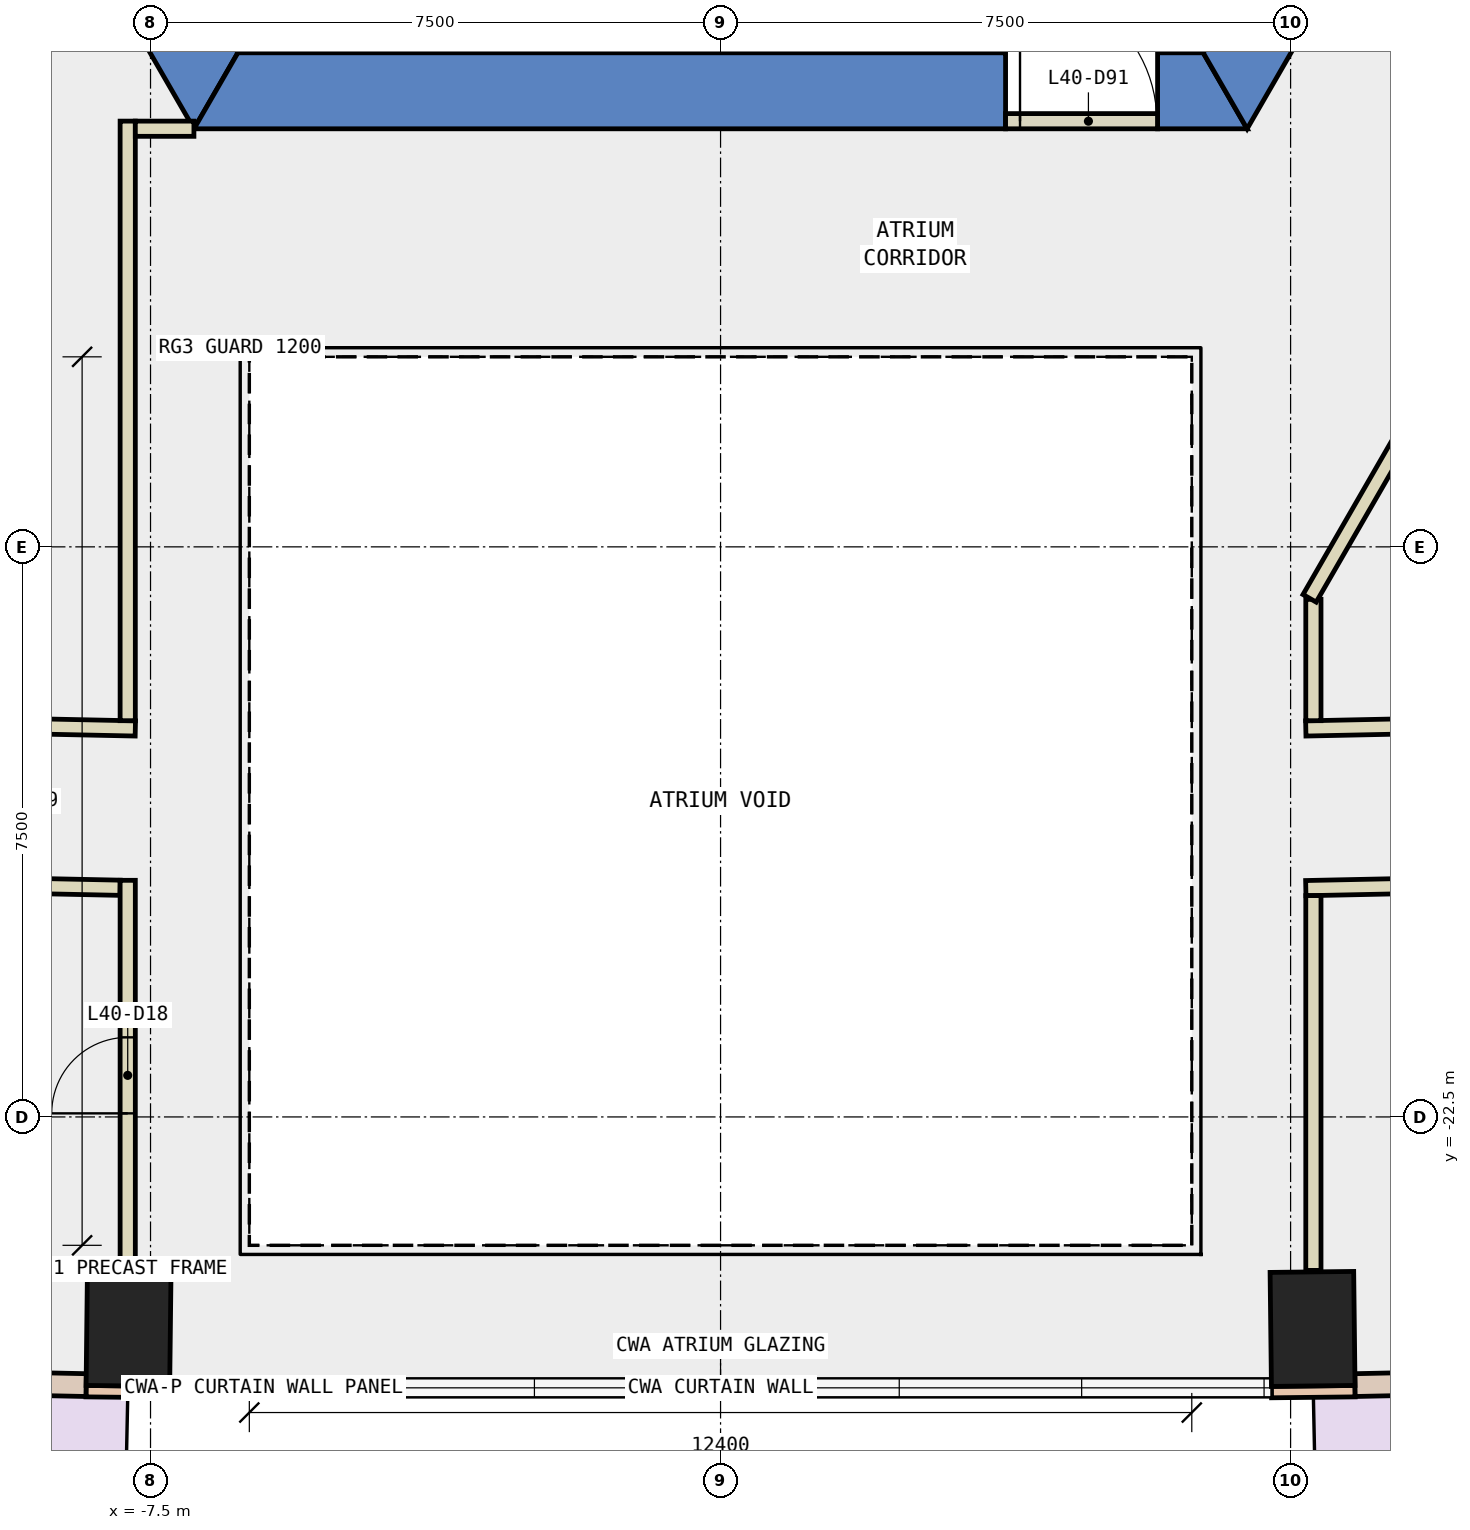
"""IFC4 building model, lengths in metres.
Left out: names, types, materials, properties, quantities, classifications, styles, units other than length and angle.
Written with IfcOpenShell. Run it as: python <this file> out.ifc"""

import sys

from ifc_helpers import new_model, si_unit, direction, frame, frame_2d, origin, origin_2d, place, context, subcontext, project, spatial, polyline, rectangle, outline, extrude, element, fill, save


model = new_model("IFC4")
c1 = context("Model", 3, precision=1e-05, world=origin(), true_north=direction((0.0, 1.0)))
c2 = subcontext(c1, "Body", "Model", "MODEL_VIEW")
j1 = project(units=[si_unit("LENGTHUNIT", "METRE"), si_unit("PLANEANGLEUNIT", "RADIAN")], contexts=[c1])
p1 = place(None, origin())
s1 = spatial("IfcSite", under=j1, at=p1, CompositionType="ELEMENT")
p2 = place(p1, origin())
s2 = spatial("IfcBuilding", under=s1, at=p2, CompositionType="ELEMENT")
p3 = place(p2, frame((0.0, 0.0, 180.2)))
s3 = spatial("IfcBuildingStorey", under=s2, at=p3, CompositionType="ELEMENT", Elevation=180.2)
for number, where, z_axis, x_axis in (
    (1, (-7.789, -25.289, -0.4), (0.0, 0.0, 1.0), (-1.0, 0.012, 0.0)),
    (2, (7.789, -25.289, -0.4), (0.0, 0.0, 1.0), (1.0, 0.012, 0.0)),
):
    element("IfcColumn", number, at=place(p3, frame(where, z_axis=z_axis, x_axis=x_axis)), inside=s3, PredefinedType="COLUMN", context=c2, shape_type="SweptSolid", body=[
        extrude(rectangle(XDim=1.1, YDim=1.5, at=origin_2d()), origin(), (0.0, 0.0, 1.0), 4.0),
    ])
p4 = place(p3, frame((0.0, 0.0, -0.4)))
e3 = element("IfcWall", 3, at=p4, inside=s3, PredefinedType="SHEAR", context=c2, shape_type="SweptSolid", body=[
    extrude(outline(polyline([(-13.856, 2.5), (-6.928, -9.5), (-6.351, -8.5), (-12.702, 2.5), (-13.856, 2.5)])), origin(), (0.0, 0.0, 1.0), 4.0),
])
p5 = place(p3, frame((0.0, 0.0, -0.4)))
e4 = element("IfcWall", 4, at=p5, inside=s3, PredefinedType="SHEAR", context=c2, shape_type="SweptSolid", body=[
    extrude(outline(polyline([(3.75, -9.5), (3.75, -8.5), (-6.351, -8.5), (-6.928, -9.5), (3.75, -9.5)])), origin(), (0.0, 0.0, 1.0), 4.0),
])
p6 = place(p3, frame((0.0, 0.0, -0.4)))
e5 = element("IfcWall", 5, at=p6, inside=s3, PredefinedType="SHEAR", context=c2, shape_type="SweptSolid", body=[
    extrude(outline(polyline([(5.75, -8.5), (5.75, -9.5), (6.928, -9.5), (6.351, -8.5), (5.75, -8.5)])), origin(), (0.0, 0.0, 1.0), 4.0),
])
p7 = place(p3, frame((0.0, 0.0, -0.4)))
e6 = element("IfcWall", 6, at=p7, inside=s3, PredefinedType="SHEAR", context=c2, shape_type="SweptSolid", body=[
    extrude(outline(polyline([(8.117, -7.44), (7.252, -6.94), (6.351, -8.5), (6.928, -9.5), (8.117, -7.44)])), origin(), (0.0, 0.0, 1.0), 4.0),
])
for number, where, z_axis, x_axis in (
    (7, (-8.349, -26.108, 0.0), (0.0, 0.0, 1.0), (1.0, -0.011, 0.0)),
    (8, (7.249, -26.12, 0.0), (0.0, 0.0, 1.0), (1.0, 0.011, 0.0)),
):
    element("IfcWall", number, at=place(p3, frame(where, z_axis=z_axis, x_axis=x_axis)), inside=s3, PredefinedType="STANDARD", context=c2, shape_type="SweptSolid", body=[
        extrude(rectangle(XDim=1.1, YDim=0.15, at=frame_2d((0.55, 0.0))), origin(), (0.0, 0.0, 1.0), 3.6),
    ])
p8 = place(p3, frame((-15.68, -25.875, 0.0), z_axis=(0.0, 0.0, 1.0), x_axis=(0.999782189413, -0.020870403275, 0.0)))
e9 = element("IfcWall", 9, at=p8, inside=s3, PredefinedType="STANDARD", context=c2, shape_type="SweptSolid", body=[
    extrude(rectangle(XDim=7.335, YDim=0.3, at=frame_2d((3.667, 0.0))), origin(), (0.0, 0.0, 1.0), 3.6),
])
p9 = place(p8, frame((0.834, 0.0, 0.0)))
e10 = element("IfcOpeningElement", 10, at=p9, cuts=e9, PredefinedType="OPENING", context=c2, shape_type="SweptSolid", body=[
    extrude(rectangle(XDim=2.0, YDim=2.4, at=frame_2d((1.0, 1.2))), frame((0.0, 0.16, 0.0), z_axis=(0.0, -1.0, 0.0), x_axis=(1.0, 0.0, 0.0)), (0.0, 0.0, 1.0), 0.32),
])
p10 = place(p8, frame((4.301, 0.0, 0.9)))
e11 = element("IfcOpeningElement", 11, at=p10, cuts=e9, PredefinedType="OPENING", context=c2, shape_type="SweptSolid", body=[
    extrude(rectangle(XDim=2.4, YDim=2.6, at=frame_2d((1.2, 1.3))), frame((0.0, 0.16, 0.0), z_axis=(0.0, -1.0, 0.0), x_axis=(1.0, 0.0, 0.0)), (0.0, 0.0, 1.0), 0.32),
])
p11 = place(p3, frame((8.347, -26.028, 0.0), z_axis=(0.0, 0.0, 1.0), x_axis=(0.999782189413, 0.020870403275, 0.0)))
e12 = element("IfcWall", 12, at=p11, inside=s3, PredefinedType="STANDARD", context=c2, shape_type="SweptSolid", body=[
    extrude(rectangle(XDim=7.335, YDim=0.3, at=frame_2d((3.667, 0.0))), origin(), (0.0, 0.0, 1.0), 3.6),
])
p12 = place(p11, frame((0.834, 0.0, 0.0)))
e13 = element("IfcOpeningElement", 13, at=p12, cuts=e12, PredefinedType="OPENING", context=c2, shape_type="SweptSolid", body=[
    extrude(rectangle(XDim=2.0, YDim=2.4, at=frame_2d((1.0, 1.2))), frame((0.0, 0.16, 0.0), z_axis=(0.0, -1.0, 0.0), x_axis=(1.0, 0.0, 0.0)), (0.0, 0.0, 1.0), 0.32),
])
p13 = place(p11, frame((4.301, 0.0, 0.9)))
e14 = element("IfcOpeningElement", 14, at=p13, cuts=e12, PredefinedType="OPENING", context=c2, shape_type="SweptSolid", body=[
    extrude(rectangle(XDim=2.4, YDim=2.6, at=frame_2d((1.2, 1.3))), frame((0.0, 0.16, 0.0), z_axis=(0.0, -1.0, 0.0), x_axis=(1.0, 0.0, 0.0)), (0.0, 0.0, 1.0), 0.32),
])
p14 = place(p3, frame((7.7, -17.389, 0.0), z_axis=(0.0, 0.0, 1.0), x_axis=(0.999782442794, 0.020858261713, 0.0)))
e15 = element("IfcWall", 15, at=p14, inside=s3, PredefinedType="PARTITIONING", context=c2, shape_type="SweptSolid", body=[
    extrude(rectangle(XDim=8.287, YDim=0.2, at=frame_2d((4.144, 0.0))), origin(), (0.0, 0.0, 1.0), 3.6),
])
p15 = place(p14, frame((3.644, 0.0, 0.0)))
e16 = element("IfcOpeningElement", 16, at=p15, cuts=e15, PredefinedType="OPENING", context=c2, shape_type="SweptSolid", body=[
    extrude(rectangle(XDim=1.0, YDim=2.1, at=frame_2d((0.5, 1.05))), frame((0.0, 0.11, 0.0), z_axis=(0.0, -1.0, 0.0), x_axis=(1.0, 0.0, 0.0)), (0.0, 0.0, 1.0), 0.22),
])
p16 = place(p3, frame((-15.985, -17.216, 0.0), z_axis=(0.0, 0.0, 1.0), x_axis=(0.999782442794, -0.020858261713, 0.0)))
e17 = element("IfcWall", 17, at=p16, inside=s3, PredefinedType="PARTITIONING", context=c2, shape_type="SweptSolid", body=[
    extrude(rectangle(XDim=8.287, YDim=0.2, at=frame_2d((4.144, 0.0))), origin(), (0.0, 0.0, 1.0), 3.6),
])
p17 = place(p16, frame((3.244, 0.0, 0.0)))
e18 = element("IfcOpeningElement", 18, at=p17, cuts=e17, PredefinedType="OPENING", context=c2, shape_type="SweptSolid", body=[
    extrude(rectangle(XDim=1.8, YDim=2.1, at=frame_2d((0.9, 1.05))), frame((0.0, 0.11, 0.0), z_axis=(0.0, -1.0, 0.0), x_axis=(1.0, 0.0, 0.0)), (0.0, 0.0, 1.0), 0.22),
])
p18 = place(p3, frame((16.045, -19.316, 0.0), z_axis=(0.0, 0.0, 1.0), x_axis=(-0.99978251073, -0.020855005124, 0.0)))
e19 = element("IfcWall", 19, at=p18, inside=s3, PredefinedType="PARTITIONING", context=c2, shape_type="SweptSolid", body=[
    extrude(rectangle(XDim=8.347, YDim=0.2, at=frame_2d((4.173, 0.0))), origin(), (0.0, 0.0, 1.0), 3.6),
])
p19 = place(p18, frame((3.673, 0.0, 0.0)))
e20 = element("IfcOpeningElement", 20, at=p19, cuts=e19, PredefinedType="OPENING", context=c2, shape_type="SweptSolid", body=[
    extrude(rectangle(XDim=1.0, YDim=2.1, at=frame_2d((0.5, 1.05))), frame((0.0, 0.11, 0.0), z_axis=(0.0, -1.0, 0.0), x_axis=(1.0, 0.0, 0.0)), (0.0, 0.0, 1.0), 0.22),
])
p20 = place(p3, frame((-7.9, -19.485, 0.0), z_axis=(0.0, 0.0, 1.0), x_axis=(-0.999784330337, 0.020767590419, 0.0)))
e21 = element("IfcWall", 21, at=p20, inside=s3, PredefinedType="PARTITIONING", context=c2, shape_type="SweptSolid", body=[
    extrude(rectangle(XDim=3.903, YDim=0.2, at=frame_2d((1.951, 0.0))), origin(), (0.0, 0.0, 1.0), 3.6),
])
p21 = place(p3, frame((7.8, -15.69, 0.0), z_axis=(0.0, 0.0, 1.0), x_axis=(0.0, -1.0, 0.0)))
e22 = element("IfcWall", 22, at=p21, inside=s3, PredefinedType="PARTITIONING", context=c2, shape_type="SweptSolid", body=[
    extrude(rectangle(XDim=1.597, YDim=0.2, at=frame_2d((0.799, 0.0))), origin(), (0.0, 0.0, 1.0), 3.6),
])
p22 = place(p3, frame((-7.8, -17.287, 0.0), z_axis=(0.0, 0.0, 1.0), x_axis=(0.0, 1.0, 0.0)))
e23 = element("IfcWall", 23, at=p22, inside=s3, PredefinedType="PARTITIONING", context=c2, shape_type="SweptSolid", body=[
    extrude(rectangle(XDim=7.888, YDim=0.2, at=frame_2d((3.944, 0.0))), origin(), (0.0, 0.0, 1.0), 3.6),
])
p23 = place(p3, frame((-7.7, -9.499, 0.0), z_axis=(0.0, 0.0, 1.0), x_axis=(1.0, 0.0, 0.0)))
e24 = element("IfcWall", 24, at=p23, inside=s3, PredefinedType="PARTITIONING", context=c2, shape_type="SweptSolid", body=[
    extrude(rectangle(XDim=0.771, YDim=0.2, at=frame_2d((0.385, 0.0))), origin(), (0.0, 0.0, 1.0), 3.6),
])
p24 = place(p3, frame((7.8, -19.588, 0.0), z_axis=(0.0, 0.0, 1.0), x_axis=(0.0, -1.0, 0.0)))
e25 = element("IfcWall", 25, at=p24, inside=s3, PredefinedType="PARTITIONING", context=c2, shape_type="SweptSolid", body=[
    extrude(rectangle(XDim=4.931, YDim=0.2, at=frame_2d((2.466, 0.0))), origin(), (0.0, 0.0, 1.0), 3.6),
])
p25 = place(p3, frame((-7.8, -24.519, 0.0), z_axis=(0.0, 0.0, 1.0), x_axis=(0.0, 1.0, 0.0)))
e26 = element("IfcWall", 26, at=p25, inside=s3, PredefinedType="PARTITIONING", context=c2, shape_type="SweptSolid", body=[
    extrude(rectangle(XDim=5.132, YDim=0.2, at=frame_2d((2.566, 0.0))), origin(), (0.0, 0.0, 1.0), 3.6),
])
p26 = place(p25, frame((2.066, 0.0, 0.0)))
e27 = element("IfcOpeningElement", 27, at=p26, cuts=e26, PredefinedType="OPENING", context=c2, shape_type="SweptSolid", body=[
    extrude(rectangle(XDim=1.0, YDim=2.1, at=frame_2d((0.5, 1.05))), frame((0.0, 0.11, 0.0), z_axis=(0.0, -1.0, 0.0), x_axis=(1.0, 0.0, 0.0)), (0.0, 0.0, 1.0), 0.22),
])
p27 = place(p3, frame((12.476, -7.491, 0.0), z_axis=(0.0, 0.0, 1.0), x_axis=(-0.499989258007, -0.866031605588, 0.0)))
e28 = element("IfcWall", 28, at=p27, inside=s3, PredefinedType="PARTITIONING", context=c2, shape_type="SweptSolid", body=[
    extrude(rectangle(XDim=9.452, YDim=0.2, at=frame_2d((4.726, 0.0))), origin(), (0.0, 0.0, 1.0), 3.6),
])
p28 = place(p3, frame((3.75, -9.4, 0.0), z_axis=(0.0, 0.0, 1.0), x_axis=(1.0, 0.0, 0.0)))
e29 = element("IfcWall", 29, at=p28, inside=s3, PredefinedType="PARTITIONING", context=c2, shape_type="SweptSolid", body=[
    extrude(rectangle(XDim=2.0, YDim=0.2, at=frame_2d((1.0, 0.0))), origin(), (0.0, 0.0, 1.0), 2.4),
])
p29 = place(p28, frame((0.19, 0.0, 0.0)))
e30 = element("IfcOpeningElement", 30, at=p29, cuts=e29, PredefinedType="OPENING", context=c2, shape_type="SweptSolid", body=[
    extrude(rectangle(XDim=1.8, YDim=2.1, at=frame_2d((0.9, 1.05))), frame((0.0, 0.11, 0.0), z_axis=(0.0, -1.0, 0.0), x_axis=(1.0, 0.0, 0.0)), (0.0, 0.0, 1.0), 0.22),
])
p30 = place(p26, origin())
e31 = element("IfcDoor", 31, at=p30, inside=s3, OperationType="SINGLE_SWING_LEFT", PredefinedType="DOOR", context=c2, shape_type="SweptSolid", body=[
    extrude(rectangle(XDim=1.0, YDim=2.1, at=frame_2d((0.5, 1.05))), frame((0.0, 0.025, 0.0), z_axis=(0.0, -1.0, 0.0), x_axis=(1.0, 0.0, 0.0)), (0.0, 0.0, 1.0), 0.05),
])
fill(e27, e31)
p31 = place(p29, origin())
e32 = element("IfcDoor", 32, at=p31, inside=s3, OperationType="DOUBLE_DOOR_SINGLE_SWING", PredefinedType="DOOR", context=c2, shape_type="SweptSolid", body=[
    extrude(rectangle(XDim=1.8, YDim=2.1, at=frame_2d((0.9, 1.05))), frame((0.0, 0.025, 0.0), z_axis=(0.0, -1.0, 0.0), x_axis=(1.0, 0.0, 0.0)), (0.0, 0.0, 1.0), 0.05),
])
fill(e30, e32)
save(model, sys.argv[1])
